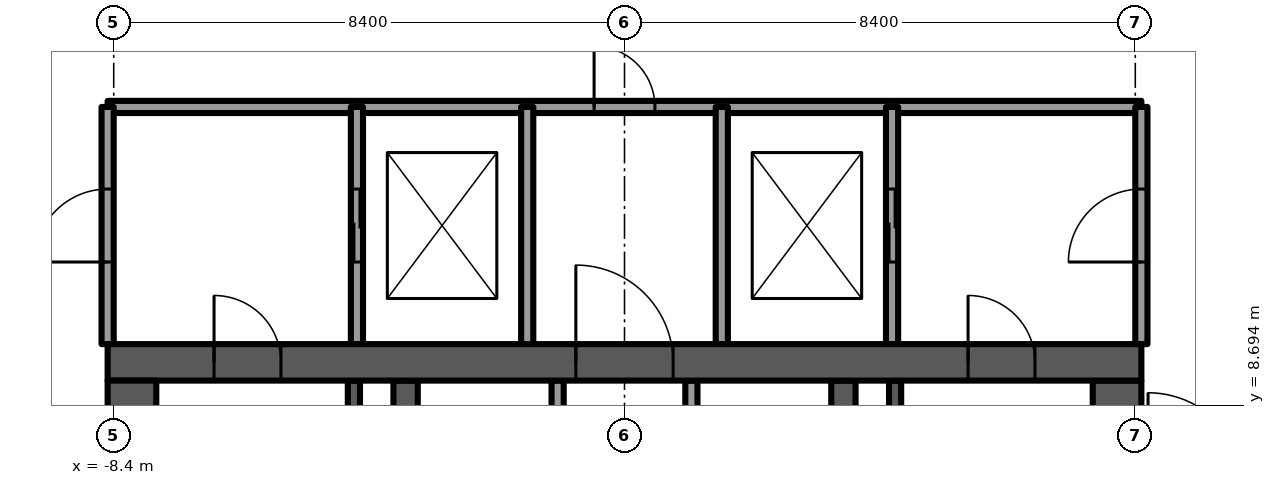
"""IFC4 building model, lengths in metres.
Left out: names, types, materials, properties, quantities, classifications, styles, units other than length and angle.
Written with IfcOpenShell. Run it as: python <this file> out.ifc"""

import sys

from ifc_helpers import new_model, si_unit, direction, frame, frame_2d, origin, place, context, subcontext, project, spatial, rectangle, extrude, element, fill, save


model = new_model("IFC4")
c1 = context("Model", 3, precision=1e-05, world=origin(), true_north=direction((0.0, 1.0)))
c2 = subcontext(c1, "Body", "Model", "MODEL_VIEW")
j1 = project(units=[si_unit("LENGTHUNIT", "METRE"), si_unit("PLANEANGLEUNIT", "RADIAN")], contexts=[c1])
p1 = place(None, origin())
s1 = spatial("IfcSite", under=j1, at=p1, CompositionType="ELEMENT")
p2 = place(p1, origin())
s2 = spatial("IfcBuilding", under=s1, at=p2, CompositionType="ELEMENT")
p3 = place(p2, frame((0.0, 0.0, 222.0)))
s3 = spatial("IfcBuildingStorey", under=s2, at=p3, CompositionType="ELEMENT", Elevation=222.0)
p4 = place(p3, frame((-8.5, 9.4, -0.3), z_axis=(0.0, 0.0, 1.0), x_axis=(1.0, 0.0, 0.0)))
e1 = element("IfcWall", 1, at=p4, inside=s3, PredefinedType="SHEAR", context=c2, shape_type="SweptSolid", body=[
    extrude(rectangle(XDim=17.0, YDim=0.6, at=frame_2d((8.5, 0.0))), origin(), (0.0, 0.0, 1.0), 3.75),
])
p5 = place(p4, frame((7.7, 0.0, 0.0)))
e2 = element("IfcOpeningElement", 2, at=p5, cuts=e1, PredefinedType="OPENING", context=c2, shape_type="SweptSolid", body=[
    extrude(rectangle(XDim=1.6, YDim=2.1, at=frame_2d((0.8, 1.05))), frame((0.0, 0.3, 0.0), z_axis=(0.0, -1.0, 0.0), x_axis=(1.0, 0.0, 0.0)), (0.0, 0.0, 1.0), 0.6),
])
p6 = place(p4, frame((1.75, 0.0, 0.0)))
e3 = element("IfcOpeningElement", 3, at=p6, cuts=e1, PredefinedType="OPENING", context=c2, shape_type="SweptSolid", body=[
    extrude(rectangle(XDim=1.1, YDim=2.1, at=frame_2d((0.55, 1.05))), frame((0.0, 0.3, 0.0), z_axis=(0.0, -1.0, 0.0), x_axis=(1.0, 0.0, 0.0)), (0.0, 0.0, 1.0), 0.6),
])
p7 = place(p4, frame((14.15, 0.0, 0.0)))
e4 = element("IfcOpeningElement", 4, at=p7, cuts=e1, PredefinedType="OPENING", context=c2, shape_type="SweptSolid", body=[
    extrude(rectangle(XDim=1.1, YDim=2.1, at=frame_2d((0.55, 1.05))), frame((0.0, 0.3, 0.0), z_axis=(0.0, -1.0, 0.0), x_axis=(1.0, 0.0, 0.0)), (0.0, 0.0, 1.0), 0.6),
])
p8 = place(p3, frame((-8.1, -1.1, -0.3), z_axis=(0.0, 0.0, 1.0), x_axis=(0.0, 1.0, 0.0)))
e5 = element("IfcWall", 5, at=p8, inside=s3, PredefinedType="SHEAR", context=c2, shape_type="SweptSolid", body=[
    extrude(rectangle(XDim=10.2, YDim=0.8, at=frame_2d((5.1, 0.0))), origin(), (0.0, 0.0, 1.0), 3.75),
])
p9 = place(p8, frame((8.35, 0.0, 0.0)))
e6 = element("IfcOpeningElement", 6, at=p9, cuts=e5, PredefinedType="OPENING", context=c2, shape_type="SweptSolid", body=[
    extrude(rectangle(XDim=1.1, YDim=2.1, at=frame_2d((0.55, 1.05))), frame((0.0, 0.4, 0.0), z_axis=(0.0, -1.0, 0.0), x_axis=(1.0, 0.0, 0.0)), (0.0, 0.0, 1.0), 0.8),
])
p10 = place(p3, frame((8.1, -1.1, -0.3), z_axis=(0.0, 0.0, 1.0), x_axis=(0.0, 1.0, 0.0)))
e7 = element("IfcWall", 7, at=p10, inside=s3, PredefinedType="SHEAR", context=c2, shape_type="SweptSolid", body=[
    extrude(rectangle(XDim=10.2, YDim=0.8, at=frame_2d((5.1, 0.0))), origin(), (0.0, 0.0, 1.0), 3.75),
])
p11 = place(p10, frame((8.35, 0.0, 0.0)))
e8 = element("IfcOpeningElement", 8, at=p11, cuts=e7, PredefinedType="OPENING", context=c2, shape_type="SweptSolid", body=[
    extrude(rectangle(XDim=1.1, YDim=2.1, at=frame_2d((0.55, 1.05))), frame((0.0, 0.4, 0.0), z_axis=(0.0, -1.0, 0.0), x_axis=(1.0, 0.0, 0.0)), (0.0, 0.0, 1.0), 0.8),
])
for number, where, z_axis, x_axis in (
    (9, (-3.6, -1.1, -0.3), (0.0, 0.0, 1.0), (0.0, 1.0, 0.0)),
    (10, (3.6, -1.1, -0.3), (0.0, 0.0, 1.0), (0.0, 1.0, 0.0)),
):
    element("IfcWall", number, at=place(p3, frame(where, z_axis=z_axis, x_axis=x_axis)), inside=s3, PredefinedType="SHEAR", context=c2, shape_type="SweptSolid", body=[
        extrude(rectangle(XDim=10.2, YDim=0.4, at=frame_2d((5.1, 0.0))), origin(), (0.0, 0.0, 1.0), 3.75),
    ])
for number, where, z_axis, x_axis in (
    (11, (-9.783, 16.428, 0.0), (0.0, 0.0, 1.0), (-0.5, -0.866, 0.0)),
    (12, (12.576, 11.59, 0.0), (0.0, 0.0, 1.0), (-0.5, 0.866, 0.0)),
):
    element("IfcWall", number, at=place(p3, frame(where, z_axis=z_axis, x_axis=x_axis)), inside=s3, PredefinedType="PARAPET", context=c2, shape_type="SweptSolid", body=[
        extrude(rectangle(XDim=5.586, YDim=0.9, at=frame_2d((2.793, 0.0))), origin(), (0.0, 0.0, 1.0), 1.1),
    ])
for number, where, z_axis, x_axis in (
    (13, (-1.1, 6.2, 0.0), (0.0, 0.0, 1.0), (0.0, 1.0, 0.0)),
    (14, (1.1, 6.2, 0.0), (0.0, 0.0, 1.0), (0.0, 1.0, 0.0)),
):
    element("IfcWall", number, at=place(p3, frame(where, z_axis=z_axis, x_axis=x_axis)), inside=s3, PredefinedType="PARTITIONING", context=c2, shape_type="SweptSolid", body=[
        extrude(rectangle(XDim=2.9, YDim=0.2, at=frame_2d((1.45, 0.0))), origin(), (0.0, 0.0, 1.0), 3.45),
    ])
for number, where, z_axis, x_axis in (
    (15, (-4.45, 0.9, -0.3), (0.0, 0.0, 1.0), (0.0, 1.0, 0.0)),
    (16, (4.45, 0.9, -0.3), (0.0, 0.0, 1.0), (0.0, 1.0, 0.0)),
):
    element("IfcWall", number, at=place(p3, frame(where, z_axis=z_axis, x_axis=x_axis)), inside=s3, PredefinedType="SOLIDWALL", context=c2, shape_type="SweptSolid", body=[
        extrude(rectangle(XDim=8.2, YDim=0.2, at=frame_2d((4.1, 0.0))), origin(), (0.0, 0.0, 1.0), 3.75),
    ])
p12 = place(p3, frame((-8.5, 13.6, 0.0), z_axis=(0.0, 0.0, 1.0), x_axis=(1.0, 0.0, 0.0)))
e17 = element("IfcWall", 17, at=p12, inside=s3, PredefinedType="PARTITIONING", context=c2, shape_type="SweptSolid", body=[
    extrude(rectangle(XDim=17.0, YDim=0.2, at=frame_2d((8.5, 0.0))), origin(), (0.0, 0.0, 1.0), 3.45),
])
p13 = place(p12, frame((8.0, 0.0, 0.0)))
e18 = element("IfcOpeningElement", 18, at=p13, cuts=e17, PredefinedType="OPENING", context=c2, shape_type="SweptSolid", body=[
    extrude(rectangle(XDim=1.0, YDim=2.1, at=frame_2d((0.5, 1.05))), frame((0.0, 0.1, 0.0), z_axis=(0.0, -1.0, 0.0), x_axis=(1.0, 0.0, 0.0)), (0.0, 0.0, 1.0), 0.2),
])
p14 = place(p3, frame((-8.5, 9.7, 0.0), z_axis=(0.0, 0.0, 1.0), x_axis=(0.0, 1.0, 0.0)))
e19 = element("IfcWall", 19, at=p14, inside=s3, PredefinedType="PARTITIONING", context=c2, shape_type="SweptSolid", body=[
    extrude(rectangle(XDim=3.9, YDim=0.2, at=frame_2d((1.95, 0.0))), origin(), (0.0, 0.0, 1.0), 3.45),
])
p15 = place(p14, frame((1.35, 0.0, 0.0)))
e20 = element("IfcOpeningElement", 20, at=p15, cuts=e19, PredefinedType="OPENING", context=c2, shape_type="SweptSolid", body=[
    extrude(rectangle(XDim=1.2, YDim=2.1, at=frame_2d((0.6, 1.05))), frame((0.0, 0.1, 0.0), z_axis=(0.0, -1.0, 0.0), x_axis=(1.0, 0.0, 0.0)), (0.0, 0.0, 1.0), 0.2),
])
p16 = place(p3, frame((8.5, 9.7, 0.0), z_axis=(0.0, 0.0, 1.0), x_axis=(0.0, 1.0, 0.0)))
e21 = element("IfcWall", 21, at=p16, inside=s3, PredefinedType="PARTITIONING", context=c2, shape_type="SweptSolid", body=[
    extrude(rectangle(XDim=3.9, YDim=0.2, at=frame_2d((1.95, 0.0))), origin(), (0.0, 0.0, 1.0), 3.45),
])
p17 = place(p16, frame((1.35, 0.0, 0.0)))
e22 = element("IfcOpeningElement", 22, at=p17, cuts=e21, PredefinedType="OPENING", context=c2, shape_type="SweptSolid", body=[
    extrude(rectangle(XDim=1.2, YDim=2.1, at=frame_2d((0.6, 1.05))), frame((0.0, 0.1, 0.0), z_axis=(0.0, -1.0, 0.0), x_axis=(1.0, 0.0, 0.0)), (0.0, 0.0, 1.0), 0.2),
])
p18 = place(p3, frame((-4.4, 9.7, 0.0), z_axis=(0.0, 0.0, 1.0), x_axis=(0.0, 1.0, 0.0)))
e23 = element("IfcWall", 23, at=p18, inside=s3, PredefinedType="PARTITIONING", context=c2, shape_type="SweptSolid", body=[
    extrude(rectangle(XDim=3.9, YDim=0.2, at=frame_2d((1.95, 0.0))), origin(), (0.0, 0.0, 1.0), 3.45),
])
p19 = place(p18, frame((1.35, 0.0, 0.0)))
e24 = element("IfcOpeningElement", 24, at=p19, cuts=e23, PredefinedType="OPENING", context=c2, shape_type="SweptSolid", body=[
    extrude(rectangle(XDim=1.2, YDim=2.1, at=frame_2d((0.6, 1.05))), frame((0.0, 0.1, 0.0), z_axis=(0.0, -1.0, 0.0), x_axis=(1.0, 0.0, 0.0)), (0.0, 0.0, 1.0), 0.2),
])
p20 = place(p3, frame((4.4, 9.7, 0.0), z_axis=(0.0, 0.0, 1.0), x_axis=(0.0, 1.0, 0.0)))
e25 = element("IfcWall", 25, at=p20, inside=s3, PredefinedType="PARTITIONING", context=c2, shape_type="SweptSolid", body=[
    extrude(rectangle(XDim=3.9, YDim=0.2, at=frame_2d((1.95, 0.0))), origin(), (0.0, 0.0, 1.0), 3.45),
])
p21 = place(p20, frame((1.35, 0.0, 0.0)))
e26 = element("IfcOpeningElement", 26, at=p21, cuts=e25, PredefinedType="OPENING", context=c2, shape_type="SweptSolid", body=[
    extrude(rectangle(XDim=1.2, YDim=2.1, at=frame_2d((0.6, 1.05))), frame((0.0, 0.1, 0.0), z_axis=(0.0, -1.0, 0.0), x_axis=(1.0, 0.0, 0.0)), (0.0, 0.0, 1.0), 0.2),
])
for number, where, z_axis, x_axis in (
    (27, (-1.6, 9.7, 0.0), (0.0, 0.0, 1.0), (0.0, 1.0, 0.0)),
    (28, (1.6, 9.7, 0.0), (0.0, 0.0, 1.0), (0.0, 1.0, 0.0)),
):
    element("IfcWall", number, at=place(p3, frame(where, z_axis=z_axis, x_axis=x_axis)), inside=s3, PredefinedType="PARTITIONING", context=c2, shape_type="SweptSolid", body=[
        extrude(rectangle(XDim=3.9, YDim=0.2, at=frame_2d((1.95, 0.0))), origin(), (0.0, 0.0, 1.0), 3.45),
    ])
p22 = place(p5, origin())
e29 = element("IfcDoor", 29, at=p22, inside=s3, OperationType="DOUBLE_DOOR_SINGLE_SWING", PredefinedType="DOOR", context=c2, shape_type="SweptSolid", body=[
    extrude(rectangle(XDim=1.6, YDim=2.1, at=frame_2d((0.8, 1.05))), frame((0.0, 0.025, 0.0), z_axis=(0.0, -1.0, 0.0), x_axis=(1.0, 0.0, 0.0)), (0.0, 0.0, 1.0), 0.05),
])
fill(e2, e29)
p23 = place(p6, origin())
e30 = element("IfcDoor", 30, at=p23, inside=s3, OperationType="SINGLE_SWING_LEFT", PredefinedType="DOOR", context=c2, shape_type="SweptSolid", body=[
    extrude(rectangle(XDim=1.1, YDim=2.1, at=frame_2d((0.55, 1.05))), frame((0.0, 0.025, 0.0), z_axis=(0.0, -1.0, 0.0), x_axis=(1.0, 0.0, 0.0)), (0.0, 0.0, 1.0), 0.05),
])
fill(e3, e30)
p24 = place(p7, origin())
e31 = element("IfcDoor", 31, at=p24, inside=s3, OperationType="SINGLE_SWING_RIGHT", PredefinedType="DOOR", context=c2, shape_type="SweptSolid", body=[
    extrude(rectangle(XDim=1.1, YDim=2.1, at=frame_2d((0.55, 1.05))), frame((0.0, 0.025, 0.0), z_axis=(0.0, -1.0, 0.0), x_axis=(1.0, 0.0, 0.0)), (0.0, 0.0, 1.0), 0.05),
])
fill(e4, e31)
p25 = place(p19, origin())
e32 = element("IfcDoor", 32, at=p25, inside=s3, OperationType="SLIDING_TO_LEFT", PredefinedType="DOOR", context=c2, shape_type="SweptSolid", body=[
    extrude(rectangle(XDim=1.2, YDim=2.1, at=frame_2d((0.6, 1.05))), frame((0.0, 0.025, 0.0), z_axis=(0.0, -1.0, 0.0), x_axis=(1.0, 0.0, 0.0)), (0.0, 0.0, 1.0), 0.05),
])
fill(e24, e32)
p26 = place(p15, origin())
e33 = element("IfcDoor", 33, at=p26, inside=s3, OperationType="SINGLE_SWING_LEFT", PredefinedType="DOOR", context=c2, shape_type="SweptSolid", body=[
    extrude(rectangle(XDim=1.2, YDim=2.1, at=frame_2d((0.6, 1.05))), frame((0.0, 0.025, 0.0), z_axis=(0.0, -1.0, 0.0), x_axis=(1.0, 0.0, 0.0)), (0.0, 0.0, 1.0), 0.05),
])
fill(e20, e33)
p27 = place(p21, origin())
e34 = element("IfcDoor", 34, at=p27, inside=s3, OperationType="SLIDING_TO_LEFT", PredefinedType="DOOR", context=c2, shape_type="SweptSolid", body=[
    extrude(rectangle(XDim=1.2, YDim=2.1, at=frame_2d((0.6, 1.05))), frame((0.0, 0.025, 0.0), z_axis=(0.0, -1.0, 0.0), x_axis=(1.0, 0.0, 0.0)), (0.0, 0.0, 1.0), 0.05),
])
fill(e26, e34)
p28 = place(p17, origin())
e35 = element("IfcDoor", 35, at=p28, inside=s3, OperationType="SINGLE_SWING_LEFT", PredefinedType="DOOR", context=c2, shape_type="SweptSolid", body=[
    extrude(rectangle(XDim=1.2, YDim=2.1, at=frame_2d((0.6, 1.05))), frame((0.0, 0.025, 0.0), z_axis=(0.0, -1.0, 0.0), x_axis=(1.0, 0.0, 0.0)), (0.0, 0.0, 1.0), 0.05),
])
fill(e22, e35)
p29 = place(p13, origin())
e36 = element("IfcDoor", 36, at=p29, inside=s3, OperationType="SINGLE_SWING_LEFT", PredefinedType="DOOR", context=c2, shape_type="SweptSolid", body=[
    extrude(rectangle(XDim=1.0, YDim=2.1, at=frame_2d((0.5, 1.05))), frame((0.0, 0.025, 0.0), z_axis=(0.0, -1.0, 0.0), x_axis=(1.0, 0.0, 0.0)), (0.0, 0.0, 1.0), 0.05),
])
fill(e18, e36)
save(model, sys.argv[1])
